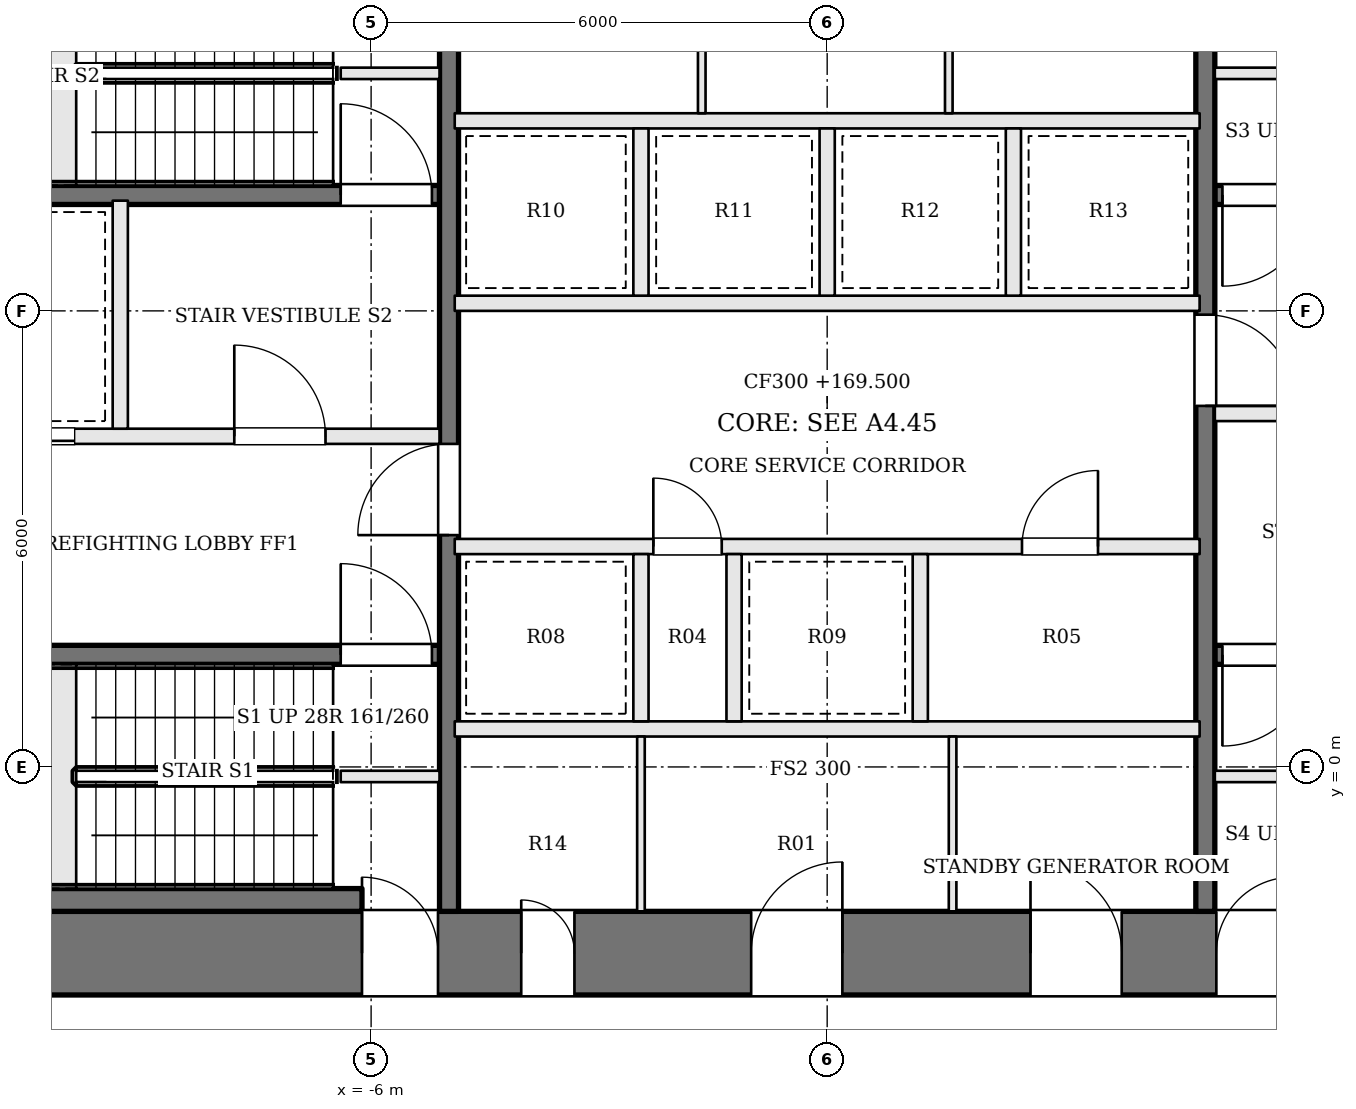
"""IFC4 building model, lengths in metres.
Left out: names, types, materials, properties, quantities, classifications, styles, units other than length and angle.
Written with IfcOpenShell. Run it as: python <this file> out.ifc"""

import sys

from ifc_helpers import new_model, si_unit, direction, frame, frame_2d, origin, place, context, subcontext, project, spatial, rectangle, extrude, element, fill, save


model = new_model("IFC4")
c1 = context("Model", 3, precision=1e-05, world=origin(), true_north=direction((0.0, 1.0)))
c2 = subcontext(c1, "Body", "Model", "MODEL_VIEW")
j1 = project(units=[si_unit("LENGTHUNIT", "METRE"), si_unit("PLANEANGLEUNIT", "RADIAN")], contexts=[c1])
p1 = place(None, origin())
s1 = spatial("IfcSite", under=j1, at=p1, CompositionType="ELEMENT")
p2 = place(p1, origin())
s2 = spatial("IfcBuilding", under=s1, at=p2, CompositionType="ELEMENT")
p3 = place(p2, frame((0.0, 0.0, 169.5)))
s3 = spatial("IfcBuildingStorey", under=s2, at=p3, CompositionType="ELEMENT", Elevation=169.5)
p4 = place(p3, frame((-13.0, -2.45, 0.0), z_axis=(0.0, 0.0, 1.0), x_axis=(1.0, 0.0, 0.0)))
e1 = element("IfcWall", 1, at=p4, inside=s3, PredefinedType="SHEAR", context=c2, shape_type="SweptSolid", body=[
    extrude(rectangle(XDim=26.0, YDim=1.1, at=frame_2d((13.0, 0.0))), origin(), (0.0, 0.0, 1.0), 4.5),
])
p5 = place(p4, frame((8.975, 0.0, 0.0)))
e2 = element("IfcOpeningElement", 2, at=p5, cuts=e1, PredefinedType="OPENING", context=c2, shape_type="SweptSolid", body=[
    extrude(rectangle(XDim=0.7, YDim=2.1, at=frame_2d((0.35, 1.05))), frame((0.0, 0.56, 0.0), z_axis=(0.0, -1.0, 0.0), x_axis=(1.0, 0.0, 0.0)), (0.0, 0.0, 1.0), 1.12),
])
p6 = place(p4, frame((12.0, 0.0, 0.0)))
e3 = element("IfcOpeningElement", 3, at=p6, cuts=e1, PredefinedType="OPENING", context=c2, shape_type="SweptSolid", body=[
    extrude(rectangle(XDim=1.2, YDim=2.1, at=frame_2d((0.6, 1.05))), frame((0.0, 0.56, 0.0), z_axis=(0.0, -1.0, 0.0), x_axis=(1.0, 0.0, 0.0)), (0.0, 0.0, 1.0), 1.12),
])
p7 = place(p4, frame((15.675, 0.0, 0.0)))
e4 = element("IfcOpeningElement", 4, at=p7, cuts=e1, PredefinedType="OPENING", context=c2, shape_type="SweptSolid", body=[
    extrude(rectangle(XDim=1.2, YDim=2.1, at=frame_2d((0.6, 1.05))), frame((0.0, 0.56, 0.0), z_axis=(0.0, -1.0, 0.0), x_axis=(1.0, 0.0, 0.0)), (0.0, 0.0, 1.0), 1.12),
])
p8 = place(p4, frame((6.88, 0.0, 0.0)))
e5 = element("IfcOpeningElement", 5, at=p8, cuts=e1, PredefinedType="OPENING", context=c2, shape_type="SweptSolid", body=[
    extrude(rectangle(XDim=1.0, YDim=2.1, at=frame_2d((0.5, 1.05))), frame((0.0, 0.56, 0.0), z_axis=(0.0, -1.0, 0.0), x_axis=(1.0, 0.0, 0.0)), (0.0, 0.0, 1.0), 1.12),
])
p9 = place(p4, frame((18.12, 0.0, 0.0)))
e6 = element("IfcOpeningElement", 6, at=p9, cuts=e1, PredefinedType="OPENING", context=c2, shape_type="SweptSolid", body=[
    extrude(rectangle(XDim=1.0, YDim=2.1, at=frame_2d((0.5, 1.05))), frame((0.0, 0.56, 0.0), z_axis=(0.0, -1.0, 0.0), x_axis=(1.0, 0.0, 0.0)), (0.0, 0.0, 1.0), 1.12),
])
for number, where, z_axis, x_axis in (
    (7, (-6.4, -0.125, 0.0), (0.0, 0.0, 1.0), (1.0, 0.0, 0.0)),
    (8, (6.4, 9.125, 0.0), (0.0, 0.0, 1.0), (-1.0, 0.0, 0.0)),
    (9, (-6.4, 9.125, 0.0), (0.0, 0.0, 1.0), (1.0, 0.0, 0.0)),
    (10, (6.4, -0.125, 0.0), (0.0, 0.0, 1.0), (-1.0, 0.0, 0.0)),
):
    element("IfcWall", number, at=place(p3, frame(where, z_axis=z_axis, x_axis=x_axis)), inside=s3, PredefinedType="SOLIDWALL", context=c2, shape_type="SweptSolid", body=[
        extrude(rectangle(XDim=1.3, YDim=0.15, at=frame_2d((0.65, 0.0))), origin(), (0.0, 0.0, 1.0), 4.3),
    ])
p10 = place(p3, frame((-11.9, 1.475, 0.0), z_axis=(0.0, 0.0, 1.0), x_axis=(1.0, 0.0, 0.0)))
e11 = element("IfcWall", 11, at=p10, inside=s3, PredefinedType="SOLIDWALL", context=c2, shape_type="SweptSolid", body=[
    extrude(rectangle(XDim=6.8, YDim=0.25, at=frame_2d((3.4, 0.0))), origin(), (0.0, 0.0, 1.0), 4.3),
])
p11 = place(p10, frame((5.5, 0.0, 0.0)))
e12 = element("IfcOpeningElement", 12, at=p11, cuts=e11, PredefinedType="OPENING", context=c2, shape_type="SweptSolid", body=[
    extrude(rectangle(XDim=1.2, YDim=2.1, at=frame_2d((0.6, 1.05))), frame((0.0, 0.135, 0.0), z_axis=(0.0, -1.0, 0.0), x_axis=(1.0, 0.0, 0.0)), (0.0, 0.0, 1.0), 0.27),
])
p12 = place(p3, frame((11.9, 7.525, 0.0), z_axis=(0.0, 0.0, 1.0), x_axis=(-1.0, 0.0, 0.0)))
e13 = element("IfcWall", 13, at=p12, inside=s3, PredefinedType="SOLIDWALL", context=c2, shape_type="SweptSolid", body=[
    extrude(rectangle(XDim=6.8, YDim=0.25, at=frame_2d((3.4, 0.0))), origin(), (0.0, 0.0, 1.0), 4.3),
])
p13 = place(p12, frame((5.5, 0.0, 0.0)))
e14 = element("IfcOpeningElement", 14, at=p13, cuts=e13, PredefinedType="OPENING", context=c2, shape_type="SweptSolid", body=[
    extrude(rectangle(XDim=1.2, YDim=2.1, at=frame_2d((0.6, 1.05))), frame((0.0, 0.135, 0.0), z_axis=(0.0, -1.0, 0.0), x_axis=(1.0, 0.0, 0.0)), (0.0, 0.0, 1.0), 0.27),
])
p14 = place(p3, frame((-11.9, 4.35, 0.0), z_axis=(0.0, 0.0, 1.0), x_axis=(1.0, 0.0, 0.0)))
e15 = element("IfcWall", 15, at=p14, inside=s3, PredefinedType="SOLIDWALL", context=c2, shape_type="SweptSolid", body=[
    extrude(rectangle(XDim=6.8, YDim=0.2, at=frame_2d((3.4, 0.0))), origin(), (0.0, 0.0, 1.0), 4.3),
])
p15 = place(p14, frame((4.1, 0.0, 0.0)))
e16 = element("IfcOpeningElement", 16, at=p15, cuts=e15, PredefinedType="OPENING", context=c2, shape_type="SweptSolid", body=[
    extrude(rectangle(XDim=1.2, YDim=2.1, at=frame_2d((0.6, 1.05))), frame((0.0, 0.11, 0.0), z_axis=(0.0, -1.0, 0.0), x_axis=(1.0, 0.0, 0.0)), (0.0, 0.0, 1.0), 0.22),
])
p16 = place(p14, frame((0.8, 0.0, 0.0)))
e17 = element("IfcOpeningElement", 17, at=p16, cuts=e15, PredefinedType="OPENING", context=c2, shape_type="SweptSolid", body=[
    extrude(rectangle(XDim=1.2, YDim=2.1, at=frame_2d((0.6, 1.05))), frame((0.0, 0.11, 0.0), z_axis=(0.0, -1.0, 0.0), x_axis=(1.0, 0.0, 0.0)), (0.0, 0.0, 1.0), 0.22),
])
p17 = place(p3, frame((11.9, 4.65, 0.0), z_axis=(0.0, 0.0, 1.0), x_axis=(-1.0, 0.0, 0.0)))
e18 = element("IfcWall", 18, at=p17, inside=s3, PredefinedType="SOLIDWALL", context=c2, shape_type="SweptSolid", body=[
    extrude(rectangle(XDim=6.8, YDim=0.2, at=frame_2d((3.4, 0.0))), origin(), (0.0, 0.0, 1.0), 4.3),
])
p18 = place(p17, frame((4.1, 0.0, 0.0)))
e19 = element("IfcOpeningElement", 19, at=p18, cuts=e18, PredefinedType="OPENING", context=c2, shape_type="SweptSolid", body=[
    extrude(rectangle(XDim=1.2, YDim=2.1, at=frame_2d((0.6, 1.05))), frame((0.0, 0.11, 0.0), z_axis=(0.0, -1.0, 0.0), x_axis=(1.0, 0.0, 0.0)), (0.0, 0.0, 1.0), 0.22),
])
p19 = place(p17, frame((0.8, 0.0, 0.0)))
e20 = element("IfcOpeningElement", 20, at=p19, cuts=e18, PredefinedType="OPENING", context=c2, shape_type="SweptSolid", body=[
    extrude(rectangle(XDim=1.2, YDim=2.1, at=frame_2d((0.6, 1.05))), frame((0.0, 0.11, 0.0), z_axis=(0.0, -1.0, 0.0), x_axis=(1.0, 0.0, 0.0)), (0.0, 0.0, 1.0), 0.22),
])
p20 = place(p3, frame((-11.9, 7.525, 0.0), z_axis=(0.0, 0.0, 1.0), x_axis=(1.0, 0.0, 0.0)))
e21 = element("IfcWall", 21, at=p20, inside=s3, PredefinedType="SOLIDWALL", context=c2, shape_type="SweptSolid", body=[
    extrude(rectangle(XDim=6.8, YDim=0.25, at=frame_2d((3.4, 0.0))), origin(), (0.0, 0.0, 1.0), 4.3),
])
p21 = place(p20, frame((5.5, 0.0, 0.0)))
e22 = element("IfcOpeningElement", 22, at=p21, cuts=e21, PredefinedType="OPENING", context=c2, shape_type="SweptSolid", body=[
    extrude(rectangle(XDim=1.2, YDim=2.1, at=frame_2d((0.6, 1.05))), frame((0.0, 0.135, 0.0), z_axis=(0.0, -1.0, 0.0), x_axis=(1.0, 0.0, 0.0)), (0.0, 0.0, 1.0), 0.27),
])
p22 = place(p3, frame((11.9, 1.475, 0.0), z_axis=(0.0, 0.0, 1.0), x_axis=(-1.0, 0.0, 0.0)))
e23 = element("IfcWall", 23, at=p22, inside=s3, PredefinedType="SOLIDWALL", context=c2, shape_type="SweptSolid", body=[
    extrude(rectangle(XDim=6.8, YDim=0.25, at=frame_2d((3.4, 0.0))), origin(), (0.0, 0.0, 1.0), 4.3),
])
p23 = place(p22, frame((5.5, 0.0, 0.0)))
e24 = element("IfcOpeningElement", 24, at=p23, cuts=e23, PredefinedType="OPENING", context=c2, shape_type="SweptSolid", body=[
    extrude(rectangle(XDim=1.2, YDim=2.1, at=frame_2d((0.6, 1.05))), frame((0.0, 0.135, 0.0), z_axis=(0.0, -1.0, 0.0), x_axis=(1.0, 0.0, 0.0)), (0.0, 0.0, 1.0), 0.27),
])
p24 = place(p3, frame((-9.3, 4.45, 0.0), z_axis=(0.0, 0.0, 1.0), x_axis=(0.0, 1.0, 0.0)))
e25 = element("IfcWall", 25, at=p24, inside=s3, PredefinedType="SOLIDWALL", context=c2, shape_type="SweptSolid", body=[
    extrude(rectangle(XDim=3.0, YDim=0.2, at=frame_2d((1.5, 0.0))), origin(), (0.0, 0.0, 1.0), 4.3),
])
p25 = place(p3, frame((-4.975, -1.9, 0.0), z_axis=(0.0, 0.0, 1.0), x_axis=(0.0, 1.0, 0.0)))
e26 = element("IfcWall", 26, at=p25, inside=s3, PredefinedType="SOLIDWALL", context=c2, shape_type="SweptSolid", body=[
    extrude(rectangle(XDim=12.8, YDim=0.25, at=frame_2d((6.4, 0.0))), origin(), (0.0, 0.0, 1.0), 4.3),
])
p26 = place(p25, frame((4.95, 0.0, 0.0)))
e27 = element("IfcOpeningElement", 27, at=p26, cuts=e26, PredefinedType="OPENING", context=c2, shape_type="SweptSolid", body=[
    extrude(rectangle(XDim=1.2, YDim=2.1, at=frame_2d((0.6, 1.05))), frame((0.0, 0.135, 0.0), z_axis=(0.0, -1.0, 0.0), x_axis=(1.0, 0.0, 0.0)), (0.0, 0.0, 1.0), 0.27),
])
p27 = place(p3, frame((4.975, 10.9, 0.0), z_axis=(0.0, 0.0, 1.0), x_axis=(0.0, -1.0, 0.0)))
e28 = element("IfcWall", 28, at=p27, inside=s3, PredefinedType="SOLIDWALL", context=c2, shape_type="SweptSolid", body=[
    extrude(rectangle(XDim=12.8, YDim=0.25, at=frame_2d((6.4, 0.0))), origin(), (0.0, 0.0, 1.0), 4.3),
])
p28 = place(p27, frame((4.95, 0.0, 0.0)))
e29 = element("IfcOpeningElement", 29, at=p28, cuts=e28, PredefinedType="OPENING", context=c2, shape_type="SweptSolid", body=[
    extrude(rectangle(XDim=1.2, YDim=2.1, at=frame_2d((0.6, 1.05))), frame((0.0, 0.135, 0.0), z_axis=(0.0, -1.0, 0.0), x_axis=(1.0, 0.0, 0.0)), (0.0, 0.0, 1.0), 0.27),
])
p29 = place(p3, frame((-11.9, -1.75, 0.0), z_axis=(0.0, 0.0, 1.0), x_axis=(1.0, 0.0, 0.0)))
e30 = element("IfcWall", 30, at=p29, inside=s3, PredefinedType="SOLIDWALL", context=c2, shape_type="SweptSolid", body=[
    extrude(rectangle(XDim=5.78, YDim=0.3, at=frame_2d((2.89, 0.0))), origin(), (0.0, 0.0, 1.0), 4.3),
])
p30 = place(p3, frame((-4.9, 0.5, 0.0), z_axis=(0.0, 0.0, 1.0), x_axis=(1.0, 0.0, 0.0)))
e31 = element("IfcWall", 31, at=p30, inside=s3, PredefinedType="SOLIDWALL", context=c2, shape_type="SweptSolid", body=[
    extrude(rectangle(XDim=9.8, YDim=0.2, at=frame_2d((4.9, 0.0))), origin(), (0.0, 0.0, 1.0), 4.3),
])
p31 = place(p3, frame((-4.9, 2.9, 0.0), z_axis=(0.0, 0.0, 1.0), x_axis=(1.0, 0.0, 0.0)))
e32 = element("IfcWall", 32, at=p31, inside=s3, PredefinedType="SOLIDWALL", context=c2, shape_type="SweptSolid", body=[
    extrude(rectangle(XDim=9.8, YDim=0.2, at=frame_2d((4.9, 0.0))), origin(), (0.0, 0.0, 1.0), 4.3),
])
p32 = place(p31, frame((2.613, 0.0, 0.0)))
e33 = element("IfcOpeningElement", 33, at=p32, cuts=e32, PredefinedType="OPENING", context=c2, shape_type="SweptSolid", body=[
    extrude(rectangle(XDim=0.9, YDim=2.1, at=frame_2d((0.45, 1.05))), frame((0.0, 0.11, 0.0), z_axis=(0.0, -1.0, 0.0), x_axis=(1.0, 0.0, 0.0)), (0.0, 0.0, 1.0), 0.22),
])
p33 = place(p31, frame((7.463, 0.0, 0.0)))
e34 = element("IfcOpeningElement", 34, at=p33, cuts=e32, PredefinedType="OPENING", context=c2, shape_type="SweptSolid", body=[
    extrude(rectangle(XDim=1.0, YDim=2.1, at=frame_2d((0.5, 1.05))), frame((0.0, 0.11, 0.0), z_axis=(0.0, -1.0, 0.0), x_axis=(1.0, 0.0, 0.0)), (0.0, 0.0, 1.0), 0.22),
])
for number, where, z_axis, x_axis in (
    (35, (-4.9, 6.1, 0.0), (0.0, 0.0, 1.0), (1.0, 0.0, 0.0)),
    (36, (-4.9, 8.5, 0.0), (0.0, 0.0, 1.0), (1.0, 0.0, 0.0)),
):
    element("IfcWall", number, at=place(p3, frame(where, z_axis=z_axis, x_axis=x_axis)), inside=s3, PredefinedType="SOLIDWALL", context=c2, shape_type="SweptSolid", body=[
        extrude(rectangle(XDim=9.8, YDim=0.2, at=frame_2d((4.9, 0.0))), origin(), (0.0, 0.0, 1.0), 4.3),
    ])
for number, where, z_axis, x_axis in (
    (37, (-2.45, 0.6, 0.0), (0.0, 0.0, 1.0), (0.0, 1.0, 0.0)),
    (38, (-1.225, 0.6, 0.0), (0.0, 0.0, 1.0), (0.0, 1.0, 0.0)),
    (39, (1.225, 0.6, 0.0), (0.0, 0.0, 1.0), (0.0, 1.0, 0.0)),
    (40, (-2.45, 6.2, 0.0), (0.0, 0.0, 1.0), (0.0, 1.0, 0.0)),
    (41, (0.0, 6.2, 0.0), (0.0, 0.0, 1.0), (0.0, 1.0, 0.0)),
    (42, (2.45, 6.2, 0.0), (0.0, 0.0, 1.0), (0.0, 1.0, 0.0)),
):
    element("IfcWall", number, at=place(p3, frame(where, z_axis=z_axis, x_axis=x_axis)), inside=s3, PredefinedType="SOLIDWALL", context=c2, shape_type="SweptSolid", body=[
        extrude(rectangle(XDim=2.2, YDim=0.2, at=frame_2d((1.1, 0.0))), origin(), (0.0, 0.0, 1.0), 4.3),
    ])
for number, where, z_axis, x_axis in (
    (43, (-2.45, -1.9, 0.0), (0.0, 0.0, 1.0), (0.0, 1.0, 0.0)),
    (44, (1.65, -1.9, 0.0), (0.0, 0.0, 1.0), (0.0, 1.0, 0.0)),
    (45, (-1.65, 8.6, 0.0), (0.0, 0.0, 1.0), (0.0, 1.0, 0.0)),
    (46, (1.6, 8.6, 0.0), (0.0, 0.0, 1.0), (0.0, 1.0, 0.0)),
):
    element("IfcWall", number, at=place(p3, frame(where, z_axis=z_axis, x_axis=x_axis)), inside=s3, PredefinedType="PARTITIONING", context=c2, shape_type="SweptSolid", body=[
        extrude(rectangle(XDim=2.3, YDim=0.1, at=frame_2d((1.15, 0.0))), origin(), (0.0, 0.0, 1.0), 4.3),
    ])
p34 = place(p26, origin())
e47 = element("IfcDoor", 47, at=p34, inside=s3, OperationType="SINGLE_SWING_LEFT", PredefinedType="DOOR", context=c2, shape_type="SweptSolid", body=[
    extrude(rectangle(XDim=1.2, YDim=2.1, at=frame_2d((0.6, 1.05))), frame((0.0, 0.025, 0.0), z_axis=(0.0, -1.0, 0.0), x_axis=(1.0, 0.0, 0.0)), (0.0, 0.0, 1.0), 0.05),
])
fill(e27, e47)
p35 = place(p28, origin())
e48 = element("IfcDoor", 48, at=p35, inside=s3, OperationType="SINGLE_SWING_RIGHT", PredefinedType="DOOR", context=c2, shape_type="SweptSolid", body=[
    extrude(rectangle(XDim=1.2, YDim=2.1, at=frame_2d((0.6, 1.05))), frame((0.0, 0.025, 0.0), z_axis=(0.0, -1.0, 0.0), x_axis=(1.0, 0.0, 0.0)), (0.0, 0.0, 1.0), 0.05),
])
fill(e29, e48)
p36 = place(p15, origin())
e49 = element("IfcDoor", 49, at=p36, inside=s3, OperationType="SINGLE_SWING_LEFT", PredefinedType="DOOR", context=c2, shape_type="SweptSolid", body=[
    extrude(rectangle(XDim=1.2, YDim=2.1, at=frame_2d((0.6, 1.05))), frame((0.0, 0.025, 0.0), z_axis=(0.0, -1.0, 0.0), x_axis=(1.0, 0.0, 0.0)), (0.0, 0.0, 1.0), 0.05),
])
fill(e16, e49)
p37 = place(p11, origin())
e50 = element("IfcDoor", 50, at=p37, inside=s3, OperationType="SINGLE_SWING_LEFT", PredefinedType="DOOR", context=c2, shape_type="SweptSolid", body=[
    extrude(rectangle(XDim=1.2, YDim=2.1, at=frame_2d((0.6, 1.05))), frame((0.0, 0.025, 0.0), z_axis=(0.0, -1.0, 0.0), x_axis=(1.0, 0.0, 0.0)), (0.0, 0.0, 1.0), 0.05),
])
fill(e12, e50)
p38 = place(p13, origin())
e51 = element("IfcDoor", 51, at=p38, inside=s3, OperationType="SINGLE_SWING_RIGHT", PredefinedType="DOOR", context=c2, shape_type="SweptSolid", body=[
    extrude(rectangle(XDim=1.2, YDim=2.1, at=frame_2d((0.6, 1.05))), frame((0.0, 0.025, 0.0), z_axis=(0.0, -1.0, 0.0), x_axis=(1.0, 0.0, 0.0)), (0.0, 0.0, 1.0), 0.05),
])
fill(e14, e51)
p39 = place(p21, origin())
e52 = element("IfcDoor", 52, at=p39, inside=s3, OperationType="SINGLE_SWING_LEFT", PredefinedType="DOOR", context=c2, shape_type="SweptSolid", body=[
    extrude(rectangle(XDim=1.2, YDim=2.1, at=frame_2d((0.6, 1.05))), frame((0.0, 0.025, 0.0), z_axis=(0.0, -1.0, 0.0), x_axis=(1.0, 0.0, 0.0)), (0.0, 0.0, 1.0), 0.05),
])
fill(e22, e52)
p40 = place(p23, origin())
e53 = element("IfcDoor", 53, at=p40, inside=s3, OperationType="SINGLE_SWING_RIGHT", PredefinedType="DOOR", context=c2, shape_type="SweptSolid", body=[
    extrude(rectangle(XDim=1.2, YDim=2.1, at=frame_2d((0.6, 1.05))), frame((0.0, 0.025, 0.0), z_axis=(0.0, -1.0, 0.0), x_axis=(1.0, 0.0, 0.0)), (0.0, 0.0, 1.0), 0.05),
])
fill(e24, e53)
p41 = place(p16, origin())
e54 = element("IfcDoor", 54, at=p41, inside=s3, OperationType="SLIDING_TO_RIGHT", PredefinedType="DOOR", context=c2, shape_type="SweptSolid", body=[
    extrude(rectangle(XDim=1.2, YDim=2.1, at=frame_2d((0.6, 1.05))), frame((0.0, 0.025, 0.0), z_axis=(0.0, -1.0, 0.0), x_axis=(1.0, 0.0, 0.0)), (0.0, 0.0, 1.0), 0.05),
])
fill(e17, e54)
p42 = place(p32, origin())
e55 = element("IfcDoor", 55, at=p42, inside=s3, OperationType="SINGLE_SWING_LEFT", PredefinedType="DOOR", context=c2, shape_type="SweptSolid", body=[
    extrude(rectangle(XDim=0.9, YDim=2.1, at=frame_2d((0.45, 1.05))), frame((0.0, 0.025, 0.0), z_axis=(0.0, -1.0, 0.0), x_axis=(1.0, 0.0, 0.0)), (0.0, 0.0, 1.0), 0.05),
])
fill(e33, e55)
p43 = place(p33, origin())
e56 = element("IfcDoor", 56, at=p43, inside=s3, OperationType="SINGLE_SWING_RIGHT", PredefinedType="DOOR", context=c2, shape_type="SweptSolid", body=[
    extrude(rectangle(XDim=1.0, YDim=2.1, at=frame_2d((0.5, 1.05))), frame((0.0, 0.025, 0.0), z_axis=(0.0, -1.0, 0.0), x_axis=(1.0, 0.0, 0.0)), (0.0, 0.0, 1.0), 0.05),
])
fill(e34, e56)
p44 = place(p5, origin())
e57 = element("IfcDoor", 57, at=p44, inside=s3, OperationType="SINGLE_SWING_LEFT", PredefinedType="DOOR", context=c2, shape_type="SweptSolid", body=[
    extrude(rectangle(XDim=0.7, YDim=2.1, at=frame_2d((0.35, 1.05))), frame((0.0, 0.025, 0.0), z_axis=(0.0, -1.0, 0.0), x_axis=(1.0, 0.0, 0.0)), (0.0, 0.0, 1.0), 0.05),
])
fill(e2, e57)
p45 = place(p6, origin())
e58 = element("IfcDoor", 58, at=p45, inside=s3, OperationType="SINGLE_SWING_RIGHT", PredefinedType="DOOR", context=c2, shape_type="SweptSolid", body=[
    extrude(rectangle(XDim=1.2, YDim=2.1, at=frame_2d((0.6, 1.05))), frame((0.0, 0.025, 0.0), z_axis=(0.0, -1.0, 0.0), x_axis=(1.0, 0.0, 0.0)), (0.0, 0.0, 1.0), 0.05),
])
fill(e3, e58)
p46 = place(p7, origin())
e59 = element("IfcDoor", 59, at=p46, inside=s3, OperationType="SINGLE_SWING_LEFT", PredefinedType="DOOR", context=c2, shape_type="SweptSolid", body=[
    extrude(rectangle(XDim=1.2, YDim=2.1, at=frame_2d((0.6, 1.05))), frame((0.0, 0.025, 0.0), z_axis=(0.0, -1.0, 0.0), x_axis=(1.0, 0.0, 0.0)), (0.0, 0.0, 1.0), 0.05),
])
fill(e4, e59)
p47 = place(p8, origin())
e60 = element("IfcDoor", 60, at=p47, inside=s3, OperationType="SINGLE_SWING_LEFT", PredefinedType="DOOR", context=c2, shape_type="SweptSolid", body=[
    extrude(rectangle(XDim=1.0, YDim=2.1, at=frame_2d((0.5, 1.05))), frame((0.0, 0.025, 0.0), z_axis=(0.0, -1.0, 0.0), x_axis=(1.0, 0.0, 0.0)), (0.0, 0.0, 1.0), 0.05),
])
fill(e5, e60)
p48 = place(p9, origin())
e61 = element("IfcDoor", 61, at=p48, inside=s3, OperationType="SINGLE_SWING_RIGHT", PredefinedType="DOOR", context=c2, shape_type="SweptSolid", body=[
    extrude(rectangle(XDim=1.0, YDim=2.1, at=frame_2d((0.5, 1.05))), frame((0.0, 0.025, 0.0), z_axis=(0.0, -1.0, 0.0), x_axis=(1.0, 0.0, 0.0)), (0.0, 0.0, 1.0), 0.05),
])
fill(e6, e61)
save(model, sys.argv[1])
